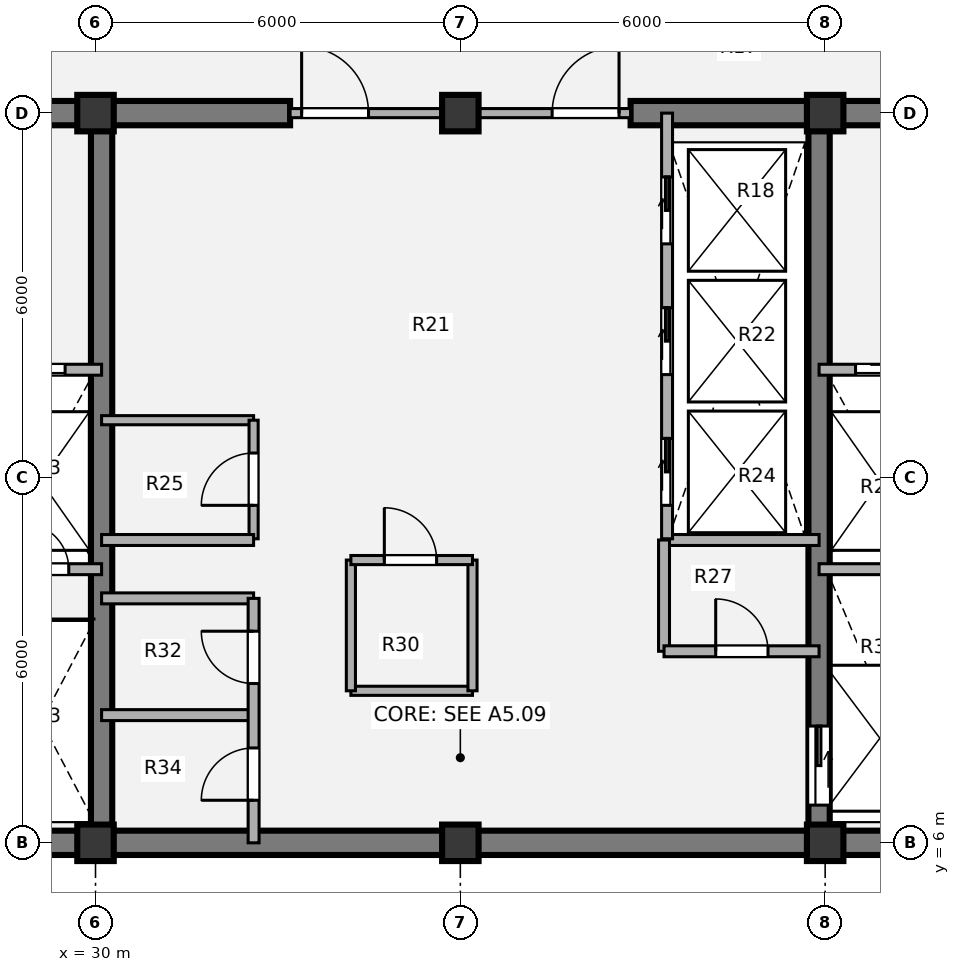
"""IFC4 building model, lengths in metres.
Left out: names, types, materials, properties, quantities, classifications, styles, units other than length and angle.
Written with IfcOpenShell. Run it as: python <this file> out.ifc"""

import sys

from ifc_helpers import new_model, si_unit, direction, frame, frame_2d, origin, origin_2d, place, context, subcontext, project, spatial, rectangle, extrude, source, transform, mapped, element, fill, save


model = new_model("IFC4")
c1 = context("Model", 3, precision=1e-05, world=origin(), true_north=direction((0.0, 1.0)))
c2 = subcontext(c1, "Body", "Model", "MODEL_VIEW")
j1 = project(units=[si_unit("LENGTHUNIT", "METRE"), si_unit("PLANEANGLEUNIT", "RADIAN")], contexts=[c1])
p1 = place(None, origin())
s1 = spatial("IfcSite", under=j1, at=p1, CompositionType="ELEMENT")
p2 = place(p1, origin())
s2 = spatial("IfcBuilding", under=s1, at=p2, CompositionType="ELEMENT")
p3 = place(p2, frame((0.0, 0.0, 245.7)))
s3 = spatial("IfcBuildingStorey", under=s2, at=p3, CompositionType="ELEMENT", Elevation=245.7)
m1 = source(origin(), c2, "Body", "SweptSolid", [
    extrude(rectangle(XDim=0.6, YDim=0.6, at=origin_2d()), origin(), (0.0, 0.0, 1.0), 3.78),
])
for number, where, z_axis, x_axis in (
    (1, (30.0, 6.0, 0.0), (0.0, 0.0, 1.0), (1.0, 0.0, 0.0)),
    (2, (36.0, 6.0, 0.0), (0.0, 0.0, 1.0), (1.0, 0.0, 0.0)),
    (3, (42.0, 6.0, 0.0), (0.0, 0.0, 1.0), (1.0, 0.0, 0.0)),
    (4, (30.0, 18.0, 0.0), (0.0, 0.0, 1.0), (1.0, 0.0, 0.0)),
    (5, (36.0, 18.0, 0.0), (0.0, 0.0, 1.0), (1.0, 0.0, 0.0)),
    (6, (42.0, 18.0, 0.0), (0.0, 0.0, 1.0), (1.0, 0.0, 0.0)),
):
    element("IfcColumn", number, at=place(p3, frame(where, z_axis=z_axis, x_axis=x_axis)), inside=s3, PredefinedType="COLUMN", context=c2, shape_type="MappedRepresentation", body=[
        mapped(m1, transform((0.0, 0.0, 0.0), x_axis=(1.0, 0.0, 0.0), y_axis=(0.0, 1.0, 0.0), z_axis=(0.0, 0.0, 1.0), scale=1.0)),
    ])
p4 = place(p3, frame((48.2, 6.0, 0.0), z_axis=(0.0, 0.0, 1.0), x_axis=(-1.0, 0.0, 0.0)))
e7 = element("IfcWall", 7, at=p4, inside=s3, PredefinedType="SHEAR", context=c2, shape_type="SweptSolid", body=[
    extrude(rectangle(XDim=24.4, YDim=0.4, at=frame_2d((12.2, 0.0))), origin(), (0.0, 0.0, 1.0), 3.78),
])
p5 = place(p3, frame((23.8, 18.0, 0.0), z_axis=(0.0, 0.0, 1.0), x_axis=(1.0, 0.0, 0.0)))
e8 = element("IfcWall", 8, at=p5, inside=s3, PredefinedType="SHEAR", context=c2, shape_type="SweptSolid", body=[
    extrude(rectangle(XDim=9.4, YDim=0.4, at=frame_2d((4.7, 0.0))), origin(), (0.0, 0.0, 1.0), 3.78),
])
p6 = place(p5, frame((2.95, 0.0, 0.0)))
e9 = element("IfcOpeningElement", 9, at=p6, cuts=e8, PredefinedType="OPENING", context=c2, shape_type="SweptSolid", body=[
    extrude(rectangle(XDim=1.1, YDim=2.1, at=origin_2d()), frame((0.55, 0.21, 1.05), z_axis=(0.0, -1.0, 0.0), x_axis=(1.0, 0.0, 0.0)), (0.0, 0.0, 1.0), 0.42),
])
p7 = place(p3, frame((38.8, 18.0, 0.0), z_axis=(0.0, 0.0, 1.0), x_axis=(1.0, 0.0, 0.0)))
e10 = element("IfcWall", 10, at=p7, inside=s3, PredefinedType="SHEAR", context=c2, shape_type="SweptSolid", body=[
    extrude(rectangle(XDim=9.4, YDim=0.4, at=frame_2d((4.7, 0.0))), origin(), (0.0, 0.0, 1.0), 3.78),
])
p8 = place(p7, frame((5.45, 0.0, 0.0)))
e11 = element("IfcOpeningElement", 11, at=p8, cuts=e10, PredefinedType="OPENING", context=c2, shape_type="SweptSolid", body=[
    extrude(rectangle(XDim=1.1, YDim=2.1, at=origin_2d()), frame((0.55, 0.21, 1.05), z_axis=(0.0, -1.0, 0.0), x_axis=(1.0, 0.0, 0.0)), (0.0, 0.0, 1.0), 0.42),
])
p9 = place(p3, frame((30.1, 6.0, 0.0), z_axis=(0.0, 0.0, 1.0), x_axis=(0.0, 1.0, 0.0)))
e12 = element("IfcWall", 12, at=p9, inside=s3, PredefinedType="SHEAR", context=c2, shape_type="SweptSolid", body=[
    extrude(rectangle(XDim=12.0, YDim=0.35, at=frame_2d((6.0, 0.0))), origin(), (0.0, 0.0, 1.0), 3.78),
])
p10 = place(p3, frame((41.9, 18.0, 0.0), z_axis=(0.0, 0.0, 1.0), x_axis=(0.0, -1.0, 0.0)))
e13 = element("IfcWall", 13, at=p10, inside=s3, PredefinedType="SHEAR", context=c2, shape_type="SweptSolid", body=[
    extrude(rectangle(XDim=12.0, YDim=0.35, at=frame_2d((6.0, 0.0))), origin(), (0.0, 0.0, 1.0), 3.78),
])
p11 = place(p10, frame((10.08, 0.0, 0.0)))
e14 = element("IfcOpeningElement", 14, at=p11, cuts=e13, PredefinedType="OPENING", context=c2, shape_type="SweptSolid", body=[
    extrude(rectangle(XDim=1.3, YDim=2.1, at=origin_2d()), frame((0.65, 0.185, 1.05), z_axis=(0.0, -1.0, 0.0), x_axis=(1.0, 0.0, 0.0)), (0.0, 0.0, 1.0), 0.37),
])
p12 = place(p3, frame((30.1, 12.95, 0.0), z_axis=(0.0, 0.0, 1.0), x_axis=(1.0, 0.0, 0.0)))
e15 = element("IfcWall", 15, at=p12, inside=s3, PredefinedType="PARTITIONING", context=c2, shape_type="SweptSolid", body=[
    extrude(rectangle(XDim=2.5, YDim=0.15, at=frame_2d((1.25, 0.0))), origin(), (0.0, 0.0, 1.0), 3.5),
])
p13 = place(p3, frame((32.6, 11.0, 0.0), z_axis=(0.0, 0.0, 1.0), x_axis=(0.0, 1.0, 0.0)))
e16 = element("IfcWall", 16, at=p13, inside=s3, PredefinedType="PARTITIONING", context=c2, shape_type="SweptSolid", body=[
    extrude(rectangle(XDim=1.95, YDim=0.15, at=frame_2d((0.975, 0.0))), origin(), (0.0, 0.0, 1.0), 3.5),
])
p14 = place(p13, frame((0.55, 0.0, 0.0)))
e17 = element("IfcOpeningElement", 17, at=p14, cuts=e16, PredefinedType="OPENING", context=c2, shape_type="SweptSolid", body=[
    extrude(rectangle(XDim=0.86, YDim=2.1, at=origin_2d()), frame((0.43, 0.085, 1.05), z_axis=(0.0, -1.0, 0.0), x_axis=(1.0, 0.0, 0.0)), (0.0, 0.0, 1.0), 0.17),
])
p15 = place(p3, frame((34.2, 8.5, 0.0), z_axis=(0.0, 0.0, 1.0), x_axis=(1.0, 0.0, 0.0)))
e18 = element("IfcWall", 18, at=p15, inside=s3, PredefinedType="PARTITIONING", context=c2, shape_type="SweptSolid", body=[
    extrude(rectangle(XDim=2.0, YDim=0.15, at=frame_2d((1.0, 0.0))), origin(), (0.0, 0.0, 1.0), 3.5),
])
p16 = place(p3, frame((34.2, 8.5, 0.0), z_axis=(0.0, 0.0, 1.0), x_axis=(0.0, 1.0, 0.0)))
e19 = element("IfcWall", 19, at=p16, inside=s3, PredefinedType="PARTITIONING", context=c2, shape_type="SweptSolid", body=[
    extrude(rectangle(XDim=2.15, YDim=0.15, at=frame_2d((1.075, 0.0))), origin(), (0.0, 0.0, 1.0), 3.5),
])
p17 = place(p3, frame((36.2, 8.5, 0.0), z_axis=(0.0, 0.0, 1.0), x_axis=(0.0, 1.0, 0.0)))
e20 = element("IfcWall", 20, at=p17, inside=s3, PredefinedType="PARTITIONING", context=c2, shape_type="SweptSolid", body=[
    extrude(rectangle(XDim=2.15, YDim=0.15, at=frame_2d((1.075, 0.0))), origin(), (0.0, 0.0, 1.0), 2.715),
])
p18 = place(p3, frame((34.2, 10.65, 0.0), z_axis=(0.0, 0.0, 1.0), x_axis=(1.0, 0.0, 0.0)))
e21 = element("IfcWall", 21, at=p18, inside=s3, PredefinedType="PARTITIONING", context=c2, shape_type="SweptSolid", body=[
    extrude(rectangle(XDim=2.0, YDim=0.15, at=frame_2d((1.0, 0.0))), origin(), (0.0, 0.0, 1.0), 3.5),
])
p19 = place(p18, frame((0.55, 0.0, 0.0)))
e22 = element("IfcOpeningElement", 22, at=p19, cuts=e21, PredefinedType="OPENING", context=c2, shape_type="SweptSolid", body=[
    extrude(rectangle(XDim=0.86, YDim=2.1, at=origin_2d()), frame((0.43, 0.085, 1.05), z_axis=(0.0, -1.0, 0.0), x_axis=(1.0, 0.0, 0.0)), (0.0, 0.0, 1.0), 0.17),
])
p20 = place(p3, frame((30.1, 10.98, 0.0), z_axis=(0.0, 0.0, 1.0), x_axis=(1.0, 0.0, 0.0)))
e23 = element("IfcWall", 23, at=p20, inside=s3, PredefinedType="PARTITIONING", context=c2, shape_type="SweptSolid", body=[
    extrude(rectangle(XDim=2.5, YDim=0.18, at=frame_2d((1.25, 0.0))), origin(), (0.0, 0.0, 1.0), 3.5),
])
p21 = place(p3, frame((39.35, 10.98, 0.0), z_axis=(0.0, 0.0, 1.0), x_axis=(1.0, 0.0, 0.0)))
e24 = element("IfcWall", 24, at=p21, inside=s3, PredefinedType="PARTITIONING", context=c2, shape_type="SweptSolid", body=[
    extrude(rectangle(XDim=2.55, YDim=0.18, at=frame_2d((1.275, 0.0))), origin(), (0.0, 0.0, 1.0), 3.5),
])
for number, where, z_axis, x_axis in (
    (25, (30.1, 8.1, 0.0), (0.0, 0.0, 1.0), (1.0, 0.0, 0.0)),
    (26, (30.1, 10.02, 0.0), (0.0, 0.0, 1.0), (1.0, 0.0, 0.0)),
):
    element("IfcWall", number, at=place(p3, frame(where, z_axis=z_axis, x_axis=x_axis)), inside=s3, PredefinedType="PARTITIONING", context=c2, shape_type="SweptSolid", body=[
        extrude(rectangle(XDim=2.5, YDim=0.18, at=frame_2d((1.25, 0.0))), origin(), (0.0, 0.0, 1.0), 3.5),
    ])
p22 = place(p3, frame((32.6, 6.0, 0.0), z_axis=(0.0, 0.0, 1.0), x_axis=(0.0, 1.0, 0.0)))
e27 = element("IfcWall", 27, at=p22, inside=s3, PredefinedType="PARTITIONING", context=c2, shape_type="SweptSolid", body=[
    extrude(rectangle(XDim=4.02, YDim=0.18, at=frame_2d((2.01, 0.0))), origin(), (0.0, 0.0, 1.0), 3.5),
])
p23 = place(p22, frame((0.7, 0.0, 0.0)))
e28 = element("IfcOpeningElement", 28, at=p23, cuts=e27, PredefinedType="OPENING", context=c2, shape_type="SweptSolid", body=[
    extrude(rectangle(XDim=0.86, YDim=2.1, at=origin_2d()), frame((0.43, 0.1, 1.05), z_axis=(0.0, -1.0, 0.0), x_axis=(1.0, 0.0, 0.0)), (0.0, 0.0, 1.0), 0.2),
])
p24 = place(p22, frame((2.62, 0.0, 0.0)))
e29 = element("IfcOpeningElement", 29, at=p24, cuts=e27, PredefinedType="OPENING", context=c2, shape_type="SweptSolid", body=[
    extrude(rectangle(XDim=0.86, YDim=2.1, at=origin_2d()), frame((0.43, 0.1, 1.05), z_axis=(0.0, -1.0, 0.0), x_axis=(1.0, 0.0, 0.0)), (0.0, 0.0, 1.0), 0.2),
])
p25 = place(p3, frame((39.35, 9.15, 0.0), z_axis=(0.0, 0.0, 1.0), x_axis=(0.0, 1.0, 0.0)))
e30 = element("IfcWall", 30, at=p25, inside=s3, PredefinedType="PARTITIONING", context=c2, shape_type="SweptSolid", body=[
    extrude(rectangle(XDim=1.83, YDim=0.18, at=frame_2d((0.915, 0.0))), origin(), (0.0, 0.0, 1.0), 3.5),
])
p26 = place(p3, frame((39.35, 9.15, 0.0), z_axis=(0.0, 0.0, 1.0), x_axis=(1.0, 0.0, 0.0)))
e31 = element("IfcWall", 31, at=p26, inside=s3, PredefinedType="PARTITIONING", context=c2, shape_type="SweptSolid", body=[
    extrude(rectangle(XDim=2.55, YDim=0.18, at=frame_2d((1.275, 0.0))), origin(), (0.0, 0.0, 1.0), 3.5),
])
p27 = place(p26, frame((0.85, 0.0, 0.0)))
e32 = element("IfcOpeningElement", 32, at=p27, cuts=e31, PredefinedType="OPENING", context=c2, shape_type="SweptSolid", body=[
    extrude(rectangle(XDim=0.86, YDim=2.1, at=origin_2d()), frame((0.43, 0.1, 1.05), z_axis=(0.0, -1.0, 0.0), x_axis=(1.0, 0.0, 0.0)), (0.0, 0.0, 1.0), 0.2),
])
p28 = place(p3, frame((33.2, 18.0, 0.0), z_axis=(0.0, 0.0, 1.0), x_axis=(1.0, 0.0, 0.0)))
e33 = element("IfcWall", 33, at=p28, inside=s3, PredefinedType="PARTITIONING", context=c2, shape_type="SweptSolid", body=[
    extrude(rectangle(XDim=5.6, YDim=0.15, at=frame_2d((2.8, 0.0))), origin(), (0.0, 0.0, 1.0), 2.515),
])
p29 = place(p28, frame((0.19, 0.0, 0.0)))
e34 = element("IfcOpeningElement", 34, at=p29, cuts=e33, PredefinedType="OPENING", context=c2, shape_type="SweptSolid", body=[
    extrude(rectangle(XDim=1.1, YDim=2.1, at=origin_2d()), frame((0.55, 0.085, 1.05), z_axis=(0.0, -1.0, 0.0), x_axis=(1.0, 0.0, 0.0)), (0.0, 0.0, 1.0), 0.17),
])
p30 = place(p28, frame((4.31, 0.0, 0.0)))
e35 = element("IfcOpeningElement", 35, at=p30, cuts=e33, PredefinedType="OPENING", context=c2, shape_type="SweptSolid", body=[
    extrude(rectangle(XDim=1.1, YDim=2.1, at=origin_2d()), frame((0.55, 0.085, 1.05), z_axis=(0.0, -1.0, 0.0), x_axis=(1.0, 0.0, 0.0)), (0.0, 0.0, 1.0), 0.17),
])
p31 = place(p3, frame((24.0, 13.78, 0.0), z_axis=(0.0, 0.0, 1.0), x_axis=(1.0, 0.0, 0.0)))
e36 = element("IfcWall", 36, at=p31, inside=s3, PredefinedType="PARTITIONING", context=c2, shape_type="SweptSolid", body=[
    extrude(rectangle(XDim=6.1, YDim=0.18, at=frame_2d((3.05, 0.0))), origin(), (0.0, 0.0, 1.0), 3.5),
])
p32 = place(p31, frame((1.15, 0.0, 0.0)))
e37 = element("IfcOpeningElement", 37, at=p32, cuts=e36, PredefinedType="OPENING", context=c2, shape_type="SweptSolid", body=[
    extrude(rectangle(XDim=1.1, YDim=2.1, at=origin_2d()), frame((0.55, 0.1, 1.05), z_axis=(0.0, -1.0, 0.0), x_axis=(1.0, 0.0, 0.0)), (0.0, 0.0, 1.0), 0.2),
])
p33 = place(p31, frame((4.4, 0.0, 0.0)))
e38 = element("IfcOpeningElement", 38, at=p33, cuts=e36, PredefinedType="OPENING", context=c2, shape_type="SweptSolid", body=[
    extrude(rectangle(XDim=1.1, YDim=2.1, at=origin_2d()), frame((0.55, 0.1, 1.05), z_axis=(0.0, -1.0, 0.0), x_axis=(1.0, 0.0, 0.0)), (0.0, 0.0, 1.0), 0.2),
])
p34 = place(p3, frame((28.15, 10.5, 0.0), z_axis=(0.0, 0.0, 1.0), x_axis=(1.0, 0.0, 0.0)))
e39 = element("IfcWall", 39, at=p34, inside=s3, PredefinedType="PARTITIONING", context=c2, shape_type="SweptSolid", body=[
    extrude(rectangle(XDim=1.95, YDim=0.18, at=frame_2d((0.975, 0.0))), origin(), (0.0, 0.0, 1.0), 3.5),
])
p35 = place(p34, frame((0.65, 0.0, 0.0)))
e40 = element("IfcOpeningElement", 40, at=p35, cuts=e39, PredefinedType="OPENING", context=c2, shape_type="SweptSolid", body=[
    extrude(rectangle(XDim=0.76, YDim=2.05, at=origin_2d()), frame((0.38, 0.1, 1.025), z_axis=(0.0, -1.0, 0.0), x_axis=(1.0, 0.0, 0.0)), (0.0, 0.0, 1.0), 0.2),
])
p36 = place(p3, frame((41.9, 13.78, 0.0), z_axis=(0.0, 0.0, 1.0), x_axis=(1.0, 0.0, 0.0)))
e41 = element("IfcWall", 41, at=p36, inside=s3, PredefinedType="PARTITIONING", context=c2, shape_type="SweptSolid", body=[
    extrude(rectangle(XDim=6.1, YDim=0.18, at=frame_2d((3.05, 0.0))), origin(), (0.0, 0.0, 1.0), 3.5),
])
p37 = place(p36, frame((0.6, 0.0, 0.0)))
e42 = element("IfcOpeningElement", 42, at=p37, cuts=e41, PredefinedType="OPENING", context=c2, shape_type="SweptSolid", body=[
    extrude(rectangle(XDim=1.1, YDim=2.1, at=origin_2d()), frame((0.55, 0.1, 1.05), z_axis=(0.0, -1.0, 0.0), x_axis=(1.0, 0.0, 0.0)), (0.0, 0.0, 1.0), 0.2),
])
p38 = place(p36, frame((3.8, 0.0, 0.0)))
e43 = element("IfcOpeningElement", 43, at=p38, cuts=e41, PredefinedType="OPENING", context=c2, shape_type="SweptSolid", body=[
    extrude(rectangle(XDim=1.1, YDim=2.1, at=origin_2d()), frame((0.55, 0.1, 1.05), z_axis=(0.0, -1.0, 0.0), x_axis=(1.0, 0.0, 0.0)), (0.0, 0.0, 1.0), 0.2),
])
p39 = place(p3, frame((41.9, 10.5, 0.0), z_axis=(0.0, 0.0, 1.0), x_axis=(1.0, 0.0, 0.0)))
e44 = element("IfcWall", 44, at=p39, inside=s3, PredefinedType="PARTITIONING", context=c2, shape_type="SweptSolid", body=[
    extrude(rectangle(XDim=1.95, YDim=0.18, at=frame_2d((0.975, 0.0))), origin(), (0.0, 0.0, 1.0), 3.5),
])
p40 = place(p3, frame((39.4, 11.0, 0.0), z_axis=(0.0, 0.0, 1.0), x_axis=(0.0, 1.0, 0.0)))
e45 = element("IfcWall", 45, at=p40, inside=s3, PredefinedType="PARTITIONING", context=c2, shape_type="SweptSolid", body=[
    extrude(rectangle(XDim=7.0, YDim=0.18, at=frame_2d((3.5, 0.0))), origin(), (0.0, 0.0, 1.0), 3.5),
])
p41 = place(p40, frame((0.55, 0.0, 0.0)))
e46 = element("IfcOpeningElement", 46, at=p41, cuts=e45, PredefinedType="OPENING", context=c2, shape_type="SweptSolid", body=[
    extrude(rectangle(XDim=1.1, YDim=2.1, at=origin_2d()), frame((0.55, 0.1, 1.05), z_axis=(0.0, -1.0, 0.0), x_axis=(1.0, 0.0, 0.0)), (0.0, 0.0, 1.0), 0.2),
])
p42 = place(p40, frame((2.7, 0.0, 0.0)))
e47 = element("IfcOpeningElement", 47, at=p42, cuts=e45, PredefinedType="OPENING", context=c2, shape_type="SweptSolid", body=[
    extrude(rectangle(XDim=1.1, YDim=2.1, at=origin_2d()), frame((0.55, 0.1, 1.05), z_axis=(0.0, -1.0, 0.0), x_axis=(1.0, 0.0, 0.0)), (0.0, 0.0, 1.0), 0.2),
])
p43 = place(p40, frame((4.85, 0.0, 0.0)))
e48 = element("IfcOpeningElement", 48, at=p43, cuts=e45, PredefinedType="OPENING", context=c2, shape_type="SweptSolid", body=[
    extrude(rectangle(XDim=1.1, YDim=2.1, at=origin_2d()), frame((0.55, 0.1, 1.05), z_axis=(0.0, -1.0, 0.0), x_axis=(1.0, 0.0, 0.0)), (0.0, 0.0, 1.0), 0.2),
])
m2 = source(origin(), c2, "Body", "SweptSolid", [
    extrude(rectangle(XDim=0.86, YDim=2.1, at=origin_2d()), frame((0.43, 0.025, 1.05), z_axis=(0.0, -1.0, 0.0), x_axis=(1.0, 0.0, 0.0)), (0.0, 0.0, 1.0), 0.05),
])
p44 = place(p14, origin())
e49 = element("IfcDoor", 49, at=p44, inside=s3, OperationType="SINGLE_SWING_LEFT", PredefinedType="DOOR", context=c2, shape_type="MappedRepresentation", body=[
    mapped(m2, transform((0.0, 0.0, 0.0), x_axis=(1.0, 0.0, 0.0), y_axis=(0.0, 1.0, 0.0), z_axis=(0.0, 0.0, 1.0), scale=1.0)),
])
fill(e17, e49)
p45 = place(p19, origin())
e50 = element("IfcDoor", 50, at=p45, inside=s3, OperationType="SINGLE_SWING_LEFT", PredefinedType="DOOR", context=c2, shape_type="MappedRepresentation", body=[
    mapped(m2, transform((0.0, 0.0, 0.0), x_axis=(1.0, 0.0, 0.0), y_axis=(0.0, 1.0, 0.0), z_axis=(0.0, 0.0, 1.0), scale=1.0)),
])
fill(e22, e50)
p46 = place(p23, origin())
e51 = element("IfcDoor", 51, at=p46, inside=s3, OperationType="SINGLE_SWING_LEFT", PredefinedType="DOOR", context=c2, shape_type="MappedRepresentation", body=[
    mapped(m2, transform((0.0, 0.0, 0.0), x_axis=(1.0, 0.0, 0.0), y_axis=(0.0, 1.0, 0.0), z_axis=(0.0, 0.0, 1.0), scale=1.0)),
])
fill(e28, e51)
p47 = place(p24, origin())
e52 = element("IfcDoor", 52, at=p47, inside=s3, OperationType="SINGLE_SWING_RIGHT", PredefinedType="DOOR", context=c2, shape_type="MappedRepresentation", body=[
    mapped(m2, transform((0.0, 0.0, 0.0), x_axis=(1.0, 0.0, 0.0), y_axis=(0.0, 1.0, 0.0), z_axis=(0.0, 0.0, 1.0), scale=1.0)),
])
fill(e29, e52)
p48 = place(p27, origin())
e53 = element("IfcDoor", 53, at=p48, inside=s3, OperationType="SINGLE_SWING_LEFT", PredefinedType="DOOR", context=c2, shape_type="MappedRepresentation", body=[
    mapped(m2, transform((0.0, 0.0, 0.0), x_axis=(1.0, 0.0, 0.0), y_axis=(0.0, 1.0, 0.0), z_axis=(0.0, 0.0, 1.0), scale=1.0)),
])
fill(e32, e53)
m3 = source(origin(), c2, "Body", "SweptSolid", [
    extrude(rectangle(XDim=1.1, YDim=2.1, at=origin_2d()), frame((0.55, 0.025, 1.05), z_axis=(0.0, -1.0, 0.0), x_axis=(1.0, 0.0, 0.0)), (0.0, 0.0, 1.0), 0.05),
])
p49 = place(p29, origin())
e54 = element("IfcDoor", 54, at=p49, inside=s3, OperationType="SINGLE_SWING_LEFT", PredefinedType="DOOR", context=c2, shape_type="MappedRepresentation", body=[
    mapped(m3, transform((0.0, 0.0, 0.0), x_axis=(1.0, 0.0, 0.0), y_axis=(0.0, 1.0, 0.0), z_axis=(0.0, 0.0, 1.0), scale=1.0)),
])
fill(e34, e54)
p50 = place(p30, origin())
e55 = element("IfcDoor", 55, at=p50, inside=s3, OperationType="SINGLE_SWING_RIGHT", PredefinedType="DOOR", context=c2, shape_type="MappedRepresentation", body=[
    mapped(m3, transform((0.0, 0.0, 0.0), x_axis=(1.0, 0.0, 0.0), y_axis=(0.0, 1.0, 0.0), z_axis=(0.0, 0.0, 1.0), scale=1.0)),
])
fill(e35, e55)
m4 = source(origin(), c2, "Body", "SweptSolid", [
    extrude(rectangle(XDim=1.1, YDim=2.1, at=origin_2d()), frame((0.55, 0.025, 1.05), z_axis=(0.0, -1.0, 0.0), x_axis=(1.0, 0.0, 0.0)), (0.0, 0.0, 1.0), 0.05),
])
p51 = place(p33, origin())
e56 = element("IfcDoor", 56, at=p51, inside=s3, OperationType="SLIDING_TO_LEFT", PredefinedType="DOOR", context=c2, shape_type="MappedRepresentation", body=[
    mapped(m4, transform((0.0, 0.0, 0.0), x_axis=(1.0, 0.0, 0.0), y_axis=(0.0, 1.0, 0.0), z_axis=(0.0, 0.0, 1.0), scale=1.0)),
])
fill(e38, e56)
m5 = source(origin(), c2, "Body", "SweptSolid", [
    extrude(rectangle(XDim=0.76, YDim=2.05, at=origin_2d()), frame((0.38, 0.025, 1.025), z_axis=(0.0, -1.0, 0.0), x_axis=(1.0, 0.0, 0.0)), (0.0, 0.0, 1.0), 0.05),
])
p52 = place(p35, origin())
e57 = element("IfcDoor", 57, at=p52, inside=s3, OperationType="SINGLE_SWING_LEFT", PredefinedType="DOOR", context=c2, shape_type="MappedRepresentation", body=[
    mapped(m5, transform((0.0, 0.0, 0.0), x_axis=(1.0, 0.0, 0.0), y_axis=(0.0, 1.0, 0.0), z_axis=(0.0, 0.0, 1.0), scale=1.0)),
])
fill(e40, e57)
p53 = place(p37, origin())
e58 = element("IfcDoor", 58, at=p53, inside=s3, OperationType="SLIDING_TO_RIGHT", PredefinedType="DOOR", context=c2, shape_type="MappedRepresentation", body=[
    mapped(m4, transform((0.0, 0.0, 0.0), x_axis=(1.0, 0.0, 0.0), y_axis=(0.0, 1.0, 0.0), z_axis=(0.0, 0.0, 1.0), scale=1.0)),
])
fill(e42, e58)
m6 = source(origin(), c2, "Body", "SweptSolid", [
    extrude(rectangle(XDim=1.3, YDim=2.1, at=origin_2d()), frame((0.65, 0.025, 1.05), z_axis=(0.0, -1.0, 0.0), x_axis=(1.0, 0.0, 0.0)), (0.0, 0.0, 1.0), 0.05),
])
p54 = place(p11, origin())
e59 = element("IfcDoor", 59, at=p54, inside=s3, OperationType="SLIDING_TO_LEFT", PredefinedType="DOOR", context=c2, shape_type="MappedRepresentation", body=[
    mapped(m6, transform((0.0, 0.0, 0.0), x_axis=(1.0, 0.0, 0.0), y_axis=(0.0, 1.0, 0.0), z_axis=(0.0, 0.0, 1.0), scale=1.0)),
])
fill(e14, e59)
p55 = place(p41, origin())
e60 = element("IfcDoor", 60, at=p55, inside=s3, OperationType="SLIDING_TO_RIGHT", PredefinedType="DOOR", context=c2, shape_type="MappedRepresentation", body=[
    mapped(m4, transform((0.0, 0.0, 0.0), x_axis=(1.0, 0.0, 0.0), y_axis=(0.0, 1.0, 0.0), z_axis=(0.0, 0.0, 1.0), scale=1.0)),
])
fill(e46, e60)
p56 = place(p42, origin())
e61 = element("IfcDoor", 61, at=p56, inside=s3, OperationType="SLIDING_TO_RIGHT", PredefinedType="DOOR", context=c2, shape_type="MappedRepresentation", body=[
    mapped(m4, transform((0.0, 0.0, 0.0), x_axis=(1.0, 0.0, 0.0), y_axis=(0.0, 1.0, 0.0), z_axis=(0.0, 0.0, 1.0), scale=1.0)),
])
fill(e47, e61)
p57 = place(p43, origin())
e62 = element("IfcDoor", 62, at=p57, inside=s3, OperationType="SLIDING_TO_RIGHT", PredefinedType="DOOR", context=c2, shape_type="MappedRepresentation", body=[
    mapped(m4, transform((0.0, 0.0, 0.0), x_axis=(1.0, 0.0, 0.0), y_axis=(0.0, 1.0, 0.0), z_axis=(0.0, 0.0, 1.0), scale=1.0)),
])
fill(e48, e62)
save(model, sys.argv[1])
